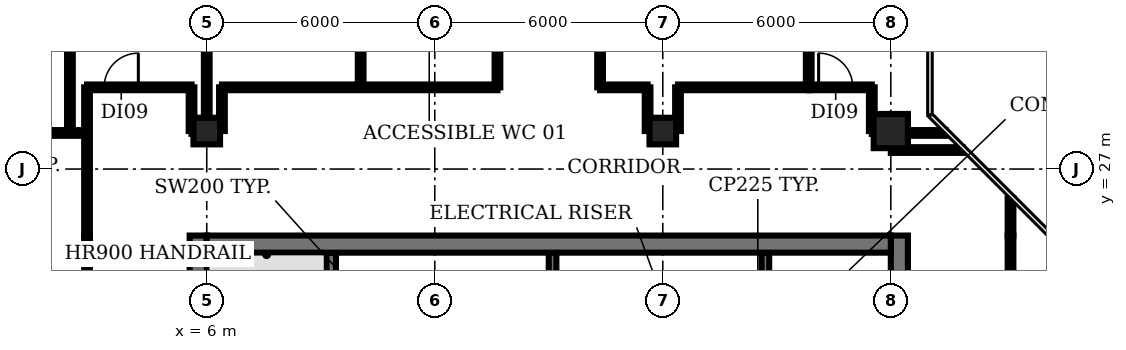
"""IFC4 building model, lengths in metres.
Left out: names, types, materials, properties, quantities, classifications, styles, units other than length and angle.
Written with IfcOpenShell. Run it as: python <this file> out.ifc"""

import sys

from ifc_helpers import new_model, si_unit, direction, frame, frame_2d, origin, origin_2d, place, context, subcontext, project, spatial, rectangle, circle, extrude, element, fill, save


model = new_model("IFC4")
c1 = context("Model", 3, precision=1e-05, world=origin(), true_north=direction((0.0, 1.0)))
c2 = subcontext(c1, "Body", "Model", "MODEL_VIEW")
j1 = project(units=[si_unit("LENGTHUNIT", "METRE"), si_unit("PLANEANGLEUNIT", "RADIAN")], contexts=[c1])
p1 = place(None, origin())
s1 = spatial("IfcSite", under=j1, at=p1, CompositionType="ELEMENT")
p2 = place(p1, origin())
s2 = spatial("IfcBuilding", under=s1, at=p2, CompositionType="ELEMENT")
p3 = place(p2, frame((0.0, 0.0, 239.0)))
s3 = spatial("IfcBuildingStorey", under=s2, at=p3, CompositionType="ELEMENT", Elevation=239.0)
for number, where, z_axis, x_axis in (
    (1, (6.0, 28.0, 0.0), (0.0, 0.0, 1.0), (1.0, 0.0, 0.0)),
    (2, (18.0, 28.0, 0.0), (0.0, 0.0, 1.0), (1.0, 0.0, 0.0)),
):
    element("IfcColumn", number, at=place(p3, frame(where, z_axis=z_axis, x_axis=x_axis)), inside=s3, PredefinedType="COLUMN", context=c2, shape_type="SweptSolid", body=[
        extrude(rectangle(XDim=0.7, YDim=0.7, at=origin_2d()), origin(), (0.0, 0.0, 1.0), 3.85),
    ])
p4 = place(p3, frame((24.0, 28.0, 0.0), z_axis=(0.0, 0.0, 1.0), x_axis=(1.0, 0.0, 0.0)))
e3 = element("IfcColumn", 3, at=p4, inside=s3, PredefinedType="COLUMN", context=c2, shape_type="SweptSolid", body=[
    extrude(circle(Radius=0.45, at=origin_2d()), origin(), (0.0, 0.0, 1.0), 3.85),
])
p5 = place(p3, frame((9.275, 18.375, 0.0), z_axis=(0.0, 0.0, 1.0), x_axis=(0.0, 1.0, 0.0)))
e4 = element("IfcWall", 4, at=p5, inside=s3, PredefinedType="SHEAR", context=c2, shape_type="SweptSolid", body=[
    extrude(rectangle(XDim=6.425, YDim=0.25, at=frame_2d((3.212, 0.0))), origin(), (0.0, 0.0, 1.0), 3.85),
])
for number, where, z_axis, x_axis in (
    (5, (15.1, 22.9, 0.0), (0.0, 0.0, 1.0), (0.0, 1.0, 0.0)),
    (6, (20.7, 22.9, 0.0), (0.0, 0.0, 1.0), (0.0, 1.0, 0.0)),
):
    element("IfcWall", number, at=place(p3, frame(where, z_axis=z_axis, x_axis=x_axis)), inside=s3, PredefinedType="SHEAR", context=c2, shape_type="SweptSolid", body=[
        extrude(rectangle(XDim=1.9, YDim=0.2, at=frame_2d((0.95, 0.0))), origin(), (0.0, 0.0, 1.0), 3.85),
    ])
p6 = place(p3, frame((5.775, 4.42, 0.0), z_axis=(0.0, 0.0, 1.0), x_axis=(0.0, 1.0, 0.0)))
e7 = element("IfcWall", 7, at=p6, inside=s3, PredefinedType="SHEAR", context=c2, shape_type="SweptSolid", body=[
    extrude(rectangle(XDim=20.83, YDim=0.45, at=frame_2d((10.415, 0.0))), origin(), (0.0, 0.0, 1.0), 3.85),
])
p7 = place(p6, frame((1.23, 0.0, 0.0)))
e8 = element("IfcOpeningElement", 8, at=p7, cuts=e7, PredefinedType="OPENING", context=c2, shape_type="SweptSolid", body=[
    extrude(rectangle(XDim=1.5, YDim=2.1, at=frame_2d((0.75, 1.05))), frame((0.0, 0.235, 0.0), z_axis=(0.0, -1.0, 0.0), x_axis=(1.0, 0.0, 0.0)), (0.0, 0.0, 1.0), 0.47),
])
p8 = place(p6, frame((7.68, 0.0, 0.0)))
e9 = element("IfcOpeningElement", 9, at=p8, cuts=e7, PredefinedType="OPENING", context=c2, shape_type="SweptSolid", body=[
    extrude(rectangle(XDim=1.2, YDim=2.1, at=frame_2d((0.6, 1.05))), frame((0.0, 0.235, 0.0), z_axis=(0.0, -1.0, 0.0), x_axis=(1.0, 0.0, 0.0)), (0.0, 0.0, 1.0), 0.47),
])
p9 = place(p6, frame((14.23, 0.0, 0.0)))
e10 = element("IfcOpeningElement", 10, at=p9, cuts=e7, PredefinedType="OPENING", context=c2, shape_type="SweptSolid", body=[
    extrude(rectangle(XDim=1.2, YDim=2.1, at=frame_2d((0.6, 1.05))), frame((0.0, 0.235, 0.0), z_axis=(0.0, -1.0, 0.0), x_axis=(1.0, 0.0, 0.0)), (0.0, 0.0, 1.0), 0.47),
])
p10 = place(p3, frame((24.225, 25.25, 0.0), z_axis=(0.0, 0.0, 1.0), x_axis=(0.0, -1.0, 0.0)))
e11 = element("IfcWall", 11, at=p10, inside=s3, PredefinedType="SHEAR", context=c2, shape_type="SweptSolid", body=[
    extrude(rectangle(XDim=20.83, YDim=0.45, at=frame_2d((10.415, 0.0))), origin(), (0.0, 0.0, 1.0), 3.85),
])
p11 = place(p10, frame((18.1, 0.0, 0.0)))
e12 = element("IfcOpeningElement", 12, at=p11, cuts=e11, PredefinedType="OPENING", context=c2, shape_type="SweptSolid", body=[
    extrude(rectangle(XDim=1.5, YDim=2.1, at=frame_2d((0.75, 1.05))), frame((0.0, 0.235, 0.0), z_axis=(0.0, -1.0, 0.0), x_axis=(1.0, 0.0, 0.0)), (0.0, 0.0, 1.0), 0.47),
])
p12 = place(p10, frame((12.0, 0.0, 0.0)))
e13 = element("IfcOpeningElement", 13, at=p12, cuts=e11, PredefinedType="OPENING", context=c2, shape_type="SweptSolid", body=[
    extrude(rectangle(XDim=0.9, YDim=2.1, at=frame_2d((0.45, 1.05))), frame((0.0, 0.235, 0.0), z_axis=(0.0, -1.0, 0.0), x_axis=(1.0, 0.0, 0.0)), (0.0, 0.0, 1.0), 0.47),
])
p13 = place(p10, frame((6.0, 0.0, 0.0)))
e14 = element("IfcOpeningElement", 14, at=p13, cuts=e11, PredefinedType="OPENING", context=c2, shape_type="SweptSolid", body=[
    extrude(rectangle(XDim=2.0, YDim=2.1, at=frame_2d((1.0, 1.05))), frame((0.0, 0.235, 0.0), z_axis=(0.0, -1.0, 0.0), x_axis=(1.0, 0.0, 0.0)), (0.0, 0.0, 1.0), 0.47),
])
p14 = place(p3, frame((6.0, 25.025, 0.0), z_axis=(0.0, 0.0, 1.0), x_axis=(1.0, 0.0, 0.0)))
e15 = element("IfcWall", 15, at=p14, inside=s3, PredefinedType="SHEAR", context=c2, shape_type="SweptSolid", body=[
    extrude(rectangle(XDim=18.0, YDim=0.45, at=frame_2d((9.0, 0.0))), origin(), (0.0, 0.0, 1.0), 3.85),
])
p15 = place(p3, frame((-1.36, 27.95, 0.0), z_axis=(0.0, 0.0, 1.0), x_axis=(1.0, 0.0, 0.0)))
e16 = element("IfcWall", 16, at=p15, inside=s3, PredefinedType="PARTITIONING", context=c2, shape_type="SweptSolid", body=[
    extrude(rectangle(XDim=4.21, YDim=0.15, at=frame_2d((2.105, 0.0))), origin(), (0.0, 0.0, 1.0), 2.88),
])
p16 = place(p3, frame((2.4, 27.95, 0.0), z_axis=(0.0, 0.0, 1.0), x_axis=(0.0, 1.0, 0.0)))
e17 = element("IfcWall", 17, at=p16, inside=s3, PredefinedType="PARTITIONING", context=c2, shape_type="SweptSolid", body=[
    extrude(rectangle(XDim=6.0, YDim=0.15, at=frame_2d((3.0, 0.0))), origin(), (0.0, 0.0, 1.0), 2.88),
])
p17 = place(p3, frame((2.85, 4.83, 0.0), z_axis=(0.0, 0.0, 1.0), x_axis=(0.0, 1.0, 0.0)))
e18 = element("IfcWall", 18, at=p17, inside=s3, PredefinedType="PARTITIONING", context=c2, shape_type="SweptSolid", body=[
    extrude(rectangle(XDim=20.42, YDim=0.15, at=frame_2d((10.21, 0.0))), origin(), (0.0, 0.0, 1.0), 2.88),
])
p18 = place(p17, frame((9.42, 0.0, 0.0)))
e19 = element("IfcOpeningElement", 19, at=p18, cuts=e18, PredefinedType="OPENING", context=c2, shape_type="SweptSolid", body=[
    extrude(rectangle(XDim=1.2, YDim=2.1, at=frame_2d((0.6, 1.05))), frame((0.0, 0.085, 0.0), z_axis=(0.0, -1.0, 0.0), x_axis=(1.0, 0.0, 0.0)), (0.0, 0.0, 1.0), 0.17),
])
p19 = place(p3, frame((2.85, 25.25, 0.0), z_axis=(0.0, 0.0, 1.0), x_axis=(0.0, 1.0, 0.0)))
e20 = element("IfcWall", 20, at=p19, inside=s3, PredefinedType="PARTITIONING", context=c2, shape_type="SweptSolid", body=[
    extrude(rectangle(XDim=3.9, YDim=0.15, at=frame_2d((1.95, 0.0))), origin(), (0.0, 0.0, 1.0), 2.88),
])
p20 = place(p3, frame((2.85, 29.15, 0.0), z_axis=(0.0, 0.0, 1.0), x_axis=(1.0, 0.0, 0.0)))
e21 = element("IfcWall", 21, at=p20, inside=s3, PredefinedType="PARTITIONING", context=c2, shape_type="SweptSolid", body=[
    extrude(rectangle(XDim=2.75, YDim=0.15, at=frame_2d((1.375, 0.0))), origin(), (0.0, 0.0, 1.0), 2.88),
])
p21 = place(p20, frame((0.45, 0.0, 0.0)))
e22 = element("IfcOpeningElement", 22, at=p21, cuts=e21, PredefinedType="OPENING", context=c2, shape_type="SweptSolid", body=[
    extrude(rectangle(XDim=0.9, YDim=2.1, at=frame_2d((0.45, 1.05))), frame((0.0, 0.085, 0.0), z_axis=(0.0, -1.0, 0.0), x_axis=(1.0, 0.0, 0.0)), (0.0, 0.0, 1.0), 0.17),
])
p22 = place(p3, frame((5.6, 28.0, 0.0), z_axis=(0.0, 0.0, 1.0), x_axis=(0.0, 1.0, 0.0)))
e23 = element("IfcWall", 23, at=p22, inside=s3, PredefinedType="PARTITIONING", context=c2, shape_type="SweptSolid", body=[
    extrude(rectangle(XDim=1.15, YDim=0.15, at=frame_2d((0.575, 0.0))), origin(), (0.0, 0.0, 1.0), 2.88),
])
p23 = place(p3, frame((5.6, 28.0, 0.0), z_axis=(0.0, 0.0, 1.0), x_axis=(1.0, 0.0, 0.0)))
e24 = element("IfcWall", 24, at=p23, inside=s3, PredefinedType="PARTITIONING", context=c2, shape_type="SweptSolid", body=[
    extrude(rectangle(XDim=0.4, YDim=0.15, at=frame_2d((0.2, 0.0))), origin(), (0.0, 0.0, 1.0), 2.88),
])
p24 = place(p3, frame((6.0, 28.0, 0.0), z_axis=(0.0, 0.0, 1.0), x_axis=(0.0, 1.0, 0.0)))
e25 = element("IfcWall", 25, at=p24, inside=s3, PredefinedType="PARTITIONING", context=c2, shape_type="SweptSolid", body=[
    extrude(rectangle(XDim=5.95, YDim=0.15, at=frame_2d((2.975, 0.0))), origin(), (0.0, 0.0, 1.0), 2.88),
])
p25 = place(p3, frame((6.4, 28.0, 0.0), z_axis=(0.0, 0.0, 1.0), x_axis=(0.0, 1.0, 0.0)))
e26 = element("IfcWall", 26, at=p25, inside=s3, PredefinedType="PARTITIONING", context=c2, shape_type="SweptSolid", body=[
    extrude(rectangle(XDim=1.15, YDim=0.15, at=frame_2d((0.575, 0.0))), origin(), (0.0, 0.0, 1.0), 2.88),
])
p26 = place(p3, frame((6.4, 29.15, 0.0), z_axis=(0.0, 0.0, 1.0), x_axis=(1.0, 0.0, 0.0)))
e27 = element("IfcWall", 27, at=p26, inside=s3, PredefinedType="PARTITIONING", context=c2, shape_type="SweptSolid", body=[
    extrude(rectangle(XDim=7.25, YDim=0.15, at=frame_2d((3.625, 0.0))), origin(), (0.0, 0.0, 1.0), 2.88),
])
p27 = place(p3, frame((10.05, 29.15, 0.0), z_axis=(0.0, 0.0, 1.0), x_axis=(0.0, 1.0, 0.0)))
e28 = element("IfcWall", 28, at=p27, inside=s3, PredefinedType="PARTITIONING", context=c2, shape_type="SweptSolid", body=[
    extrude(rectangle(XDim=4.8, YDim=0.15, at=frame_2d((2.4, 0.0))), origin(), (0.0, 0.0, 1.0), 2.88),
])
p28 = place(p3, frame((13.65, 29.15, 0.0), z_axis=(0.0, 0.0, 1.0), x_axis=(0.0, 1.0, 0.0)))
e29 = element("IfcWall", 29, at=p28, inside=s3, PredefinedType="PARTITIONING", context=c2, shape_type="SweptSolid", body=[
    extrude(rectangle(XDim=4.8, YDim=0.15, at=frame_2d((2.4, 0.0))), origin(), (0.0, 0.0, 1.0), 2.88),
])
p29 = place(p28, frame((1.6, 0.0, 0.0)))
e30 = element("IfcOpeningElement", 30, at=p29, cuts=e29, PredefinedType="OPENING", context=c2, shape_type="SweptSolid", body=[
    extrude(rectangle(XDim=0.9, YDim=2.1, at=frame_2d((0.45, 1.05))), frame((0.0, 0.085, 0.0), z_axis=(0.0, -1.0, 0.0), x_axis=(1.0, 0.0, 0.0)), (0.0, 0.0, 1.0), 0.17),
])
p30 = place(p3, frame((16.35, 29.15, 0.0), z_axis=(0.0, 0.0, 1.0), x_axis=(0.0, 1.0, 0.0)))
e31 = element("IfcWall", 31, at=p30, inside=s3, PredefinedType="PARTITIONING", context=c2, shape_type="SweptSolid", body=[
    extrude(rectangle(XDim=4.8, YDim=0.15, at=frame_2d((2.4, 0.0))), origin(), (0.0, 0.0, 1.0), 2.88),
])
p31 = place(p3, frame((16.35, 29.15, 0.0), z_axis=(0.0, 0.0, 1.0), x_axis=(1.0, 0.0, 0.0)))
e32 = element("IfcWall", 32, at=p31, inside=s3, PredefinedType="PARTITIONING", context=c2, shape_type="SweptSolid", body=[
    extrude(rectangle(XDim=1.25, YDim=0.15, at=frame_2d((0.625, 0.0))), origin(), (0.0, 0.0, 1.0), 2.88),
])
for number, where, z_axis, x_axis in (
    (33, (17.6, 28.0, 0.0), (0.0, 0.0, 1.0), (0.0, 1.0, 0.0)),
    (34, (18.4, 28.0, 0.0), (0.0, 0.0, 1.0), (0.0, 1.0, 0.0)),
):
    element("IfcWall", number, at=place(p3, frame(where, z_axis=z_axis, x_axis=x_axis)), inside=s3, PredefinedType="PARTITIONING", context=c2, shape_type="SweptSolid", body=[
        extrude(rectangle(XDim=1.15, YDim=0.15, at=frame_2d((0.575, 0.0))), origin(), (0.0, 0.0, 1.0), 2.88),
    ])
p32 = place(p3, frame((18.4, 29.15, 0.0), z_axis=(0.0, 0.0, 1.0), x_axis=(1.0, 0.0, 0.0)))
e35 = element("IfcWall", 35, at=p32, inside=s3, PredefinedType="PARTITIONING", context=c2, shape_type="SweptSolid", body=[
    extrude(rectangle(XDim=3.44, YDim=0.15, at=frame_2d((1.72, 0.0))), origin(), (0.0, 0.0, 1.0), 2.88),
])
p33 = place(p3, frame((21.84, 29.15, 0.0), z_axis=(0.0, 0.0, 1.0), x_axis=(0.0, 1.0, 0.0)))
e36 = element("IfcWall", 36, at=p33, inside=s3, PredefinedType="PARTITIONING", context=c2, shape_type="SweptSolid", body=[
    extrude(rectangle(XDim=4.8, YDim=0.15, at=frame_2d((2.4, 0.0))), origin(), (0.0, 0.0, 1.0), 2.88),
])
p34 = place(p3, frame((21.84, 29.15, 0.0), z_axis=(0.0, 0.0, 1.0), x_axis=(1.0, 0.0, 0.0)))
e37 = element("IfcWall", 37, at=p34, inside=s3, PredefinedType="PARTITIONING", context=c2, shape_type="SweptSolid", body=[
    extrude(rectangle(XDim=1.66, YDim=0.15, at=frame_2d((0.83, 0.0))), origin(), (0.0, 0.0, 1.0), 2.88),
])
p35 = place(p34, frame((0.26, 0.0, 0.0)))
e38 = element("IfcOpeningElement", 38, at=p35, cuts=e37, PredefinedType="OPENING", context=c2, shape_type="SweptSolid", body=[
    extrude(rectangle(XDim=0.9, YDim=2.1, at=frame_2d((0.45, 1.05))), frame((0.0, 0.085, 0.0), z_axis=(0.0, -1.0, 0.0), x_axis=(1.0, 0.0, 0.0)), (0.0, 0.0, 1.0), 0.17),
])
p36 = place(p3, frame((23.5, 28.0, 0.0), z_axis=(0.0, 0.0, 1.0), x_axis=(0.0, 1.0, 0.0)))
e39 = element("IfcWall", 39, at=p36, inside=s3, PredefinedType="PARTITIONING", context=c2, shape_type="SweptSolid", body=[
    extrude(rectangle(XDim=1.15, YDim=0.15, at=frame_2d((0.575, 0.0))), origin(), (0.0, 0.0, 1.0), 2.88),
])
p37 = place(p3, frame((23.5, 28.0, 0.0), z_axis=(0.0, 0.0, 1.0), x_axis=(1.0, 0.0, 0.0)))
e40 = element("IfcWall", 40, at=p37, inside=s3, PredefinedType="PARTITIONING", context=c2, shape_type="SweptSolid", body=[
    extrude(rectangle(XDim=0.5, YDim=0.15, at=frame_2d((0.25, 0.0))), origin(), (0.0, 0.0, 1.0), 2.88),
])
p38 = place(p3, frame((24.0, 27.5, 0.0), z_axis=(0.0, 0.0, 1.0), x_axis=(1.0, 0.0, 0.0)))
e41 = element("IfcWall", 41, at=p38, inside=s3, PredefinedType="PARTITIONING", context=c2, shape_type="SweptSolid", body=[
    extrude(rectangle(XDim=1.89, YDim=0.15, at=frame_2d((0.945, 0.0))), origin(), (0.0, 0.0, 1.0), 2.88),
])
p39 = place(p3, frame((24.0, 27.95, 0.0), z_axis=(0.0, 0.0, 1.0), x_axis=(1.0, 0.0, 0.0)))
e42 = element("IfcWall", 42, at=p39, inside=s3, PredefinedType="PARTITIONING", context=c2, shape_type="SweptSolid", body=[
    extrude(rectangle(XDim=1.44, YDim=0.15, at=frame_2d((0.72, 0.0))), origin(), (0.0, 0.0, 1.0), 2.88),
])
p40 = place(p3, frame((27.15, 25.25, 0.0), z_axis=(0.0, 0.0, 1.0), x_axis=(0.0, -1.0, 0.0)))
e43 = element("IfcWall", 43, at=p40, inside=s3, PredefinedType="PARTITIONING", context=c2, shape_type="SweptSolid", body=[
    extrude(rectangle(XDim=5.85, YDim=0.15, at=frame_2d((2.925, 0.0))), origin(), (0.0, 0.0, 1.0), 2.88),
])
p41 = place(p40, frame((1.65, 0.0, 0.0)))
e44 = element("IfcOpeningElement", 44, at=p41, cuts=e43, PredefinedType="OPENING", context=c2, shape_type="SweptSolid", body=[
    extrude(rectangle(XDim=1.0, YDim=2.1, at=frame_2d((0.5, 1.05))), frame((0.0, 0.085, 0.0), z_axis=(0.0, -1.0, 0.0), x_axis=(1.0, 0.0, 0.0)), (0.0, 0.0, 1.0), 0.17),
])
p42 = place(p3, frame((27.15, 25.25, 0.0), z_axis=(0.0, 0.0, 1.0), x_axis=(0.0, 1.0, 0.0)))
e45 = element("IfcWall", 45, at=p42, inside=s3, PredefinedType="PARTITIONING", context=c2, shape_type="SweptSolid", body=[
    extrude(rectangle(XDim=0.98, YDim=0.15, at=frame_2d((0.49, 0.0))), origin(), (0.0, 0.0, 1.0), 2.88),
])
p43 = place(p21, origin())
e46 = element("IfcDoor", 46, at=p43, inside=s3, OperationType="SINGLE_SWING_RIGHT", PredefinedType="DOOR", context=c2, shape_type="SweptSolid", body=[
    extrude(rectangle(XDim=0.9, YDim=2.1, at=frame_2d((0.45, 1.05))), frame((0.0, 0.025, 0.0), z_axis=(0.0, -1.0, 0.0), x_axis=(1.0, 0.0, 0.0)), (0.0, 0.0, 1.0), 0.05),
])
fill(e22, e46)
p44 = place(p35, origin())
e47 = element("IfcDoor", 47, at=p44, inside=s3, OperationType="SINGLE_SWING_LEFT", PredefinedType="DOOR", context=c2, shape_type="SweptSolid", body=[
    extrude(rectangle(XDim=0.9, YDim=2.1, at=frame_2d((0.45, 1.05))), frame((0.0, 0.025, 0.0), z_axis=(0.0, -1.0, 0.0), x_axis=(1.0, 0.0, 0.0)), (0.0, 0.0, 1.0), 0.05),
])
fill(e38, e47)
save(model, sys.argv[1])
